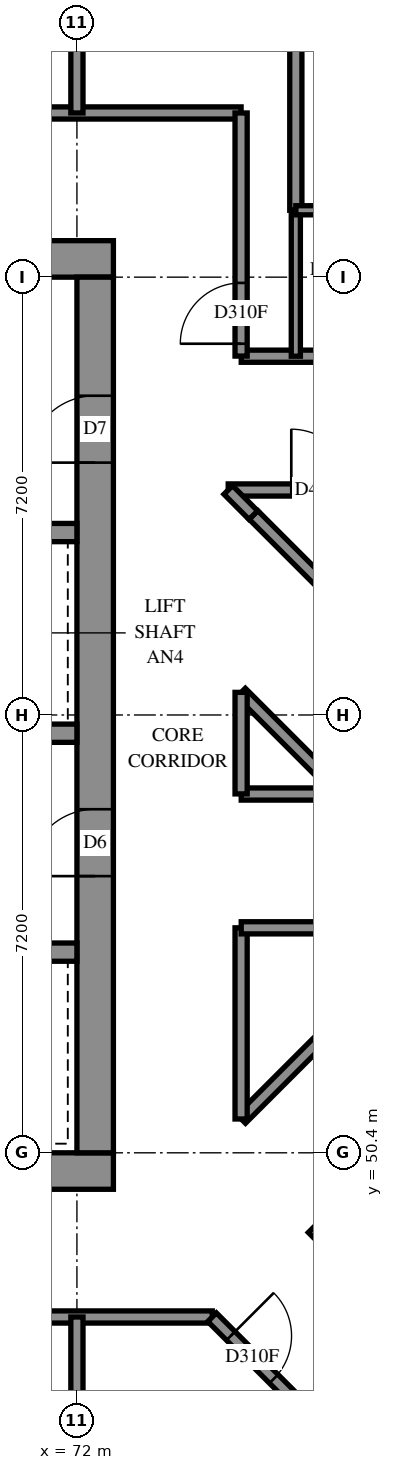
"""IFC4 building model, lengths in metres.
Left out: names, types, materials, properties, quantities, classifications, styles, units other than length and angle.
Written with IfcOpenShell. Run it as: python <this file> out.ifc"""

import sys

from ifc_helpers import new_model, si_unit, direction, frame, frame_2d, origin, place, context, subcontext, project, spatial, rectangle, extrude, element, fill, save


model = new_model("IFC4")
c1 = context("Model", 3, precision=1e-05, world=origin(), true_north=direction((0.0, 1.0)))
c2 = subcontext(c1, "Body", "Model", "MODEL_VIEW")
j1 = project(units=[si_unit("LENGTHUNIT", "METRE"), si_unit("PLANEANGLEUNIT", "RADIAN")], contexts=[c1])
p1 = place(None, origin())
s1 = spatial("IfcSite", under=j1, at=p1, CompositionType="ELEMENT")
p2 = place(p1, origin())
s2 = spatial("IfcBuilding", under=s1, at=p2, CompositionType="ELEMENT")
p3 = place(p2, frame((0.0, 0.0, 155.8)))
s3 = spatial("IfcBuildingStorey", under=s2, at=p3, CompositionType="ELEMENT", Elevation=155.8)
p4 = place(p3, frame((57.0, 50.1, -0.3), z_axis=(0.0, 0.0, 1.0), x_axis=(1.0, 0.0, 0.0)))
e1 = element("IfcWall", 1, at=p4, inside=s3, PredefinedType="SHEAR", context=c2, shape_type="SweptSolid", body=[
    extrude(rectangle(XDim=15.6, YDim=0.6, at=frame_2d((7.8, 0.0))), origin(), (0.0, 0.0, 1.0), 2.7),
])
p5 = place(p3, frame((57.0, 65.1, -0.3), z_axis=(0.0, 0.0, 1.0), x_axis=(1.0, 0.0, 0.0)))
e2 = element("IfcWall", 2, at=p5, inside=s3, PredefinedType="SHEAR", context=c2, shape_type="SweptSolid", body=[
    extrude(rectangle(XDim=15.6, YDim=0.6, at=frame_2d((7.8, 0.0))), origin(), (0.0, 0.0, 1.0), 2.7),
])
p6 = place(p5, frame((10.6, 0.0, 0.3)))
e3 = element("IfcOpeningElement", 3, at=p6, cuts=e2, PredefinedType="OPENING", context=c2, shape_type="SweptSolid", body=[
    extrude(rectangle(XDim=0.8, YDim=2.1, at=frame_2d((0.4, 1.05))), frame((0.0, 0.31, 0.0), z_axis=(0.0, -1.0, 0.0), x_axis=(1.0, 0.0, 0.0)), (0.0, 0.0, 1.0), 0.62),
])
p7 = place(p3, frame((72.3, 50.4, -0.3), z_axis=(0.0, 0.0, 1.0), x_axis=(0.0, 1.0, 0.0)))
e4 = element("IfcWall", 4, at=p7, inside=s3, PredefinedType="SHEAR", context=c2, shape_type="SweptSolid", body=[
    extrude(rectangle(XDim=14.4, YDim=0.6, at=frame_2d((7.2, 0.0))), origin(), (0.0, 0.0, 1.0), 2.7),
])
p8 = place(p7, frame((4.55, 0.0, 0.3)))
e5 = element("IfcOpeningElement", 5, at=p8, cuts=e4, PredefinedType="OPENING", context=c2, shape_type="SweptSolid", body=[
    extrude(rectangle(XDim=1.1, YDim=2.1, at=frame_2d((0.55, 1.05))), frame((0.0, 0.31, 0.0), z_axis=(0.0, -1.0, 0.0), x_axis=(1.0, 0.0, 0.0)), (0.0, 0.0, 1.0), 0.62),
])
p9 = place(p7, frame((11.35, 0.0, 0.3)))
e6 = element("IfcOpeningElement", 6, at=p9, cuts=e4, PredefinedType="OPENING", context=c2, shape_type="SweptSolid", body=[
    extrude(rectangle(XDim=1.1, YDim=2.1, at=frame_2d((0.55, 1.05))), frame((0.0, 0.31, 0.0), z_axis=(0.0, -1.0, 0.0), x_axis=(1.0, 0.0, 0.0)), (0.0, 0.0, 1.0), 0.62),
])
p10 = place(p3, frame((57.6, 53.7, 0.0), z_axis=(0.0, 0.0, 1.0), x_axis=(1.0, 0.0, 0.0)))
e7 = element("IfcWall", 7, at=p10, inside=s3, PredefinedType="SOLIDWALL", context=c2, shape_type="SweptSolid", body=[
    extrude(rectangle(XDim=14.4, YDim=0.3, at=frame_2d((7.2, 0.0))), origin(), (0.0, 0.0, 1.0), 3.1),
])
p11 = place(p10, frame((1.35, 0.0, 0.0)))
e8 = element("IfcOpeningElement", 8, at=p11, cuts=e7, PredefinedType="OPENING", context=c2, shape_type="SweptSolid", body=[
    extrude(rectangle(XDim=0.9, YDim=2.1, at=frame_2d((0.45, 1.05))), frame((0.0, 0.16, 0.0), z_axis=(0.0, -1.0, 0.0), x_axis=(1.0, 0.0, 0.0)), (0.0, 0.0, 1.0), 0.32),
])
p12 = place(p10, frame((4.95, 0.0, 0.0)))
e9 = element("IfcOpeningElement", 9, at=p12, cuts=e7, PredefinedType="OPENING", context=c2, shape_type="SweptSolid", body=[
    extrude(rectangle(XDim=0.9, YDim=2.1, at=frame_2d((0.45, 1.05))), frame((0.0, 0.16, 0.0), z_axis=(0.0, -1.0, 0.0), x_axis=(1.0, 0.0, 0.0)), (0.0, 0.0, 1.0), 0.32),
])
p13 = place(p10, frame((8.55, 0.0, 0.0)))
e10 = element("IfcOpeningElement", 10, at=p13, cuts=e7, PredefinedType="OPENING", context=c2, shape_type="SweptSolid", body=[
    extrude(rectangle(XDim=0.9, YDim=2.1, at=frame_2d((0.45, 1.05))), frame((0.0, 0.16, 0.0), z_axis=(0.0, -1.0, 0.0), x_axis=(1.0, 0.0, 0.0)), (0.0, 0.0, 1.0), 0.32),
])
p14 = place(p10, frame((12.05, 0.0, 0.0)))
e11 = element("IfcOpeningElement", 11, at=p14, cuts=e7, PredefinedType="OPENING", context=c2, shape_type="SweptSolid", body=[
    extrude(rectangle(XDim=1.1, YDim=2.1, at=frame_2d((0.55, 1.05))), frame((0.0, 0.16, 0.0), z_axis=(0.0, -1.0, 0.0), x_axis=(1.0, 0.0, 0.0)), (0.0, 0.0, 1.0), 0.32),
])
p15 = place(p3, frame((57.6, 57.3, 0.0), z_axis=(0.0, 0.0, 1.0), x_axis=(1.0, 0.0, 0.0)))
e12 = element("IfcWall", 12, at=p15, inside=s3, PredefinedType="SOLIDWALL", context=c2, shape_type="SweptSolid", body=[
    extrude(rectangle(XDim=14.4, YDim=0.3, at=frame_2d((7.2, 0.0))), origin(), (0.0, 0.0, 1.0), 3.1),
])
p16 = place(p15, frame((1.25, 0.0, 0.0)))
e13 = element("IfcOpeningElement", 13, at=p16, cuts=e12, PredefinedType="OPENING", context=c2, shape_type="SweptSolid", body=[
    extrude(rectangle(XDim=1.1, YDim=2.1, at=frame_2d((0.55, 1.05))), frame((0.0, 0.16, 0.0), z_axis=(0.0, -1.0, 0.0), x_axis=(1.0, 0.0, 0.0)), (0.0, 0.0, 1.0), 0.32),
])
p17 = place(p15, frame((4.85, 0.0, 0.0)))
e14 = element("IfcOpeningElement", 14, at=p17, cuts=e12, PredefinedType="OPENING", context=c2, shape_type="SweptSolid", body=[
    extrude(rectangle(XDim=1.1, YDim=2.1, at=frame_2d((0.55, 1.05))), frame((0.0, 0.16, 0.0), z_axis=(0.0, -1.0, 0.0), x_axis=(1.0, 0.0, 0.0)), (0.0, 0.0, 1.0), 0.32),
])
p18 = place(p15, frame((8.45, 0.0, 0.0)))
e15 = element("IfcOpeningElement", 15, at=p18, cuts=e12, PredefinedType="OPENING", context=c2, shape_type="SweptSolid", body=[
    extrude(rectangle(XDim=1.1, YDim=2.1, at=frame_2d((0.55, 1.05))), frame((0.0, 0.16, 0.0), z_axis=(0.0, -1.0, 0.0), x_axis=(1.0, 0.0, 0.0)), (0.0, 0.0, 1.0), 0.32),
])
p19 = place(p15, frame((12.05, 0.0, 0.0)))
e16 = element("IfcOpeningElement", 16, at=p19, cuts=e12, PredefinedType="OPENING", context=c2, shape_type="SweptSolid", body=[
    extrude(rectangle(XDim=1.1, YDim=2.1, at=frame_2d((0.55, 1.05))), frame((0.0, 0.16, 0.0), z_axis=(0.0, -1.0, 0.0), x_axis=(1.0, 0.0, 0.0)), (0.0, 0.0, 1.0), 0.32),
])
p20 = place(p3, frame((64.8, 60.6, 0.0), z_axis=(0.0, 0.0, 1.0), x_axis=(1.0, 0.0, 0.0)))
e17 = element("IfcWall", 17, at=p20, inside=s3, PredefinedType="SOLIDWALL", context=c2, shape_type="SweptSolid", body=[
    extrude(rectangle(XDim=7.2, YDim=0.3, at=frame_2d((3.6, 0.0))), origin(), (0.0, 0.0, 1.0), 3.1),
])
p21 = place(p3, frame((76.018, 49.302, -0.3), z_axis=(0.0, 0.0, 1.0), x_axis=(0.7071067812, -0.7071067812, 0.0)))
e18 = element("IfcWall", 18, at=p21, inside=s3, PredefinedType="SHEAR", context=c2, shape_type="SweptSolid", body=[
    extrude(rectangle(XDim=15.6, YDim=0.6, at=frame_2d((7.8, 0.0))), origin(), (0.0, 0.0, 1.0), 2.7),
])
p22 = place(p3, frame((54.9, 67.5, 0.0), z_axis=(0.0, 0.0, 1.0), x_axis=(1.0, 0.0, 0.0)))
e19 = element("IfcWall", 19, at=p22, inside=s3, PredefinedType="PARTITIONING", context=c2, shape_type="SweptSolid", body=[
    extrude(rectangle(XDim=19.8, YDim=0.2, at=frame_2d((9.9, 0.0))), origin(), (0.0, 0.0, 1.0), 3.1),
])
p23 = place(p22, frame((6.599, 0.0, 0.0)))
e20 = element("IfcOpeningElement", 20, at=p23, cuts=e19, PredefinedType="OPENING", context=c2, shape_type="SweptSolid", body=[
    extrude(rectangle(XDim=0.9, YDim=2.1, at=frame_2d((0.45, 1.05))), frame((0.0, 0.11, 0.0), z_axis=(0.0, -1.0, 0.0), x_axis=(1.0, 0.0, 0.0)), (0.0, 0.0, 1.0), 0.22),
])
p24 = place(p22, frame((13.799, 0.0, 0.0)))
e21 = element("IfcOpeningElement", 21, at=p24, cuts=e19, PredefinedType="OPENING", context=c2, shape_type="SweptSolid", body=[
    extrude(rectangle(XDim=0.9, YDim=2.1, at=frame_2d((0.45, 1.05))), frame((0.0, 0.11, 0.0), z_axis=(0.0, -1.0, 0.0), x_axis=(1.0, 0.0, 0.0)), (0.0, 0.0, 1.0), 0.22),
])
p25 = place(p3, frame((54.9, 47.7, 0.0), z_axis=(0.0, 0.0, 1.0), x_axis=(1.0, 0.0, 0.0)))
e22 = element("IfcWall", 22, at=p25, inside=s3, PredefinedType="PARTITIONING", context=c2, shape_type="SweptSolid", body=[
    extrude(rectangle(XDim=19.326, YDim=0.2, at=frame_2d((9.663, 0.0))), origin(), (0.0, 0.0, 1.0), 3.1),
])
p26 = place(p25, frame((6.643, 0.0, 0.0)))
e23 = element("IfcOpeningElement", 23, at=p26, cuts=e22, PredefinedType="OPENING", context=c2, shape_type="SweptSolid", body=[
    extrude(rectangle(XDim=0.9, YDim=2.1, at=frame_2d((0.45, 1.05))), frame((0.0, 0.11, 0.0), z_axis=(0.0, -1.0, 0.0), x_axis=(1.0, 0.0, 0.0)), (0.0, 0.0, 1.0), 0.22),
])
p27 = place(p25, frame((13.843, 0.0, 0.0)))
e24 = element("IfcOpeningElement", 24, at=p27, cuts=e22, PredefinedType="OPENING", context=c2, shape_type="SweptSolid", body=[
    extrude(rectangle(XDim=0.9, YDim=2.1, at=frame_2d((0.45, 1.05))), frame((0.0, 0.11, 0.0), z_axis=(0.0, -1.0, 0.0), x_axis=(1.0, 0.0, 0.0)), (0.0, 0.0, 1.0), 0.22),
])
p28 = place(p3, frame((75.6, 65.9, 0.0), z_axis=(0.0, 0.0, 1.0), x_axis=(0.0, 1.0, 0.0)))
e25 = element("IfcWall", 25, at=p28, inside=s3, PredefinedType="PARTITIONING", context=c2, shape_type="SweptSolid", body=[
    extrude(rectangle(XDim=6.89, YDim=0.2, at=frame_2d((3.445, 0.0))), origin(), (0.0, 0.0, 1.0), 3.1),
])
p29 = place(p3, frame((74.903, 60.889, 0.0), z_axis=(0.0, 0.0, 1.0), x_axis=(0.7071067812, -0.7071067812, 0.0)))
e26 = element("IfcWall", 26, at=p29, inside=s3, PredefinedType="PARTITIONING", context=c2, shape_type="SweptSolid", body=[
    extrude(rectangle(XDim=6.081, YDim=0.2, at=frame_2d((3.041, 0.0))), origin(), (0.0, 0.0, 1.0), 3.1),
])
p30 = place(p3, frame((74.488, 61.3, 0.0), z_axis=(0.0, 0.0, 1.0), x_axis=(1.0, 0.0, 0.0)))
e27 = element("IfcWall", 27, at=p30, inside=s3, PredefinedType="PARTITIONING", context=c2, shape_type="SweptSolid", body=[
    extrude(rectangle(XDim=4.712, YDim=0.2, at=frame_2d((2.356, 0.0))), origin(), (0.0, 0.0, 1.0), 3.1),
])
p31 = place(p30, frame((1.037, 0.0, 0.0)))
e28 = element("IfcOpeningElement", 28, at=p31, cuts=e27, PredefinedType="OPENING", context=c2, shape_type="SweptSolid", body=[
    extrude(rectangle(XDim=1.0, YDim=2.1, at=frame_2d((0.5, 1.05))), frame((0.0, 0.11, 0.0), z_axis=(0.0, -1.0, 0.0), x_axis=(1.0, 0.0, 0.0)), (0.0, 0.0, 1.0), 0.22),
])
p32 = place(p3, frame((74.223, 47.697, 0.0), z_axis=(0.0, 0.0, 1.0), x_axis=(0.7071067812, -0.7071067812, 0.0)))
e29 = element("IfcWall", 29, at=p32, inside=s3, PredefinedType="PARTITIONING", context=c2, shape_type="SweptSolid", body=[
    extrude(rectangle(XDim=4.63, YDim=0.2, at=frame_2d((2.315, 0.0))), origin(), (0.0, 0.0, 1.0), 3.1),
])
p33 = place(p32, frame((0.434, 0.0, 0.0)))
e30 = element("IfcOpeningElement", 30, at=p33, cuts=e29, PredefinedType="OPENING", context=c2, shape_type="SweptSolid", body=[
    extrude(rectangle(XDim=1.0, YDim=2.1, at=frame_2d((0.5, 1.05))), frame((0.0, 0.11, 0.0), z_axis=(0.0, -1.0, 0.0), x_axis=(1.0, 0.0, 0.0)), (0.0, 0.0, 1.0), 0.22),
])
p34 = place(p3, frame((74.702, 63.5, 0.0), z_axis=(0.0, 0.0, 1.0), x_axis=(1.0, 0.0, 0.0)))
e31 = element("IfcWall", 31, at=p34, inside=s3, PredefinedType="PARTITIONING", context=c2, shape_type="SweptSolid", body=[
    extrude(rectangle(XDim=4.498, YDim=0.2, at=frame_2d((2.249, 0.0))), origin(), (0.0, 0.0, 1.0), 3.1),
])
p35 = place(p34, frame((3.046, 0.0, 0.0)))
e32 = element("IfcOpeningElement", 32, at=p35, cuts=e31, PredefinedType="OPENING", context=c2, shape_type="SweptSolid", body=[
    extrude(rectangle(XDim=0.9, YDim=2.1, at=frame_2d((0.45, 1.05))), frame((0.0, 0.11, 0.0), z_axis=(0.0, -1.0, 0.0), x_axis=(1.0, 0.0, 0.0)), (0.0, 0.0, 1.0), 0.22),
])
p36 = place(p3, frame((74.701, 50.957, 0.0), z_axis=(0.0, 0.0, 1.0), x_axis=(0.7071067812, 0.7071067812, 0.0)))
e33 = element("IfcWall", 33, at=p36, inside=s3, PredefinedType="PARTITIONING", context=c2, shape_type="SweptSolid", body=[
    extrude(rectangle(XDim=4.444, YDim=0.2, at=frame_2d((2.222, 0.0))), origin(), (0.0, 0.0, 1.0), 3.1),
])
for number, where, z_axis, x_axis in (
    (34, (72.0, 43.65, 0.0), (0.0, 0.0, 1.0), (0.0, 1.0, 0.0)),
    (35, (72.0, 67.5, 0.0), (0.0, 0.0, 1.0), (0.0, 1.0, 0.0)),
):
    element("IfcWall", number, at=place(p3, frame(where, z_axis=z_axis, x_axis=x_axis)), inside=s3, PredefinedType="PARTITIONING", context=c2, shape_type="SweptSolid", body=[
        extrude(rectangle(XDim=4.05, YDim=0.2, at=frame_2d((2.025, 0.0))), origin(), (0.0, 0.0, 1.0), 3.1),
    ])
p37 = place(p3, frame((74.7, 63.502, 0.0), z_axis=(0.0, 0.0, 1.0), x_axis=(0.0, 1.0, 0.0)))
e36 = element("IfcWall", 36, at=p37, inside=s3, PredefinedType="PARTITIONING", context=c2, shape_type="SweptSolid", body=[
    extrude(rectangle(XDim=3.998, YDim=0.2, at=frame_2d((1.999, 0.0))), origin(), (0.0, 0.0, 1.0), 3.1),
])
p38 = place(p37, frame((0.203, 0.0, 0.0)))
e37 = element("IfcOpeningElement", 37, at=p38, cuts=e36, PredefinedType="OPENING", context=c2, shape_type="SweptSolid", body=[
    extrude(rectangle(XDim=1.0, YDim=2.1, at=frame_2d((0.5, 1.05))), frame((0.0, 0.11, 0.0), z_axis=(0.0, -1.0, 0.0), x_axis=(1.0, 0.0, 0.0)), (0.0, 0.0, 1.0), 0.22),
])
p39 = place(p3, frame((74.7, 50.956, 0.0), z_axis=(0.0, 0.0, 1.0), x_axis=(0.0, 1.0, 0.0)))
e38 = element("IfcWall", 38, at=p39, inside=s3, PredefinedType="PARTITIONING", context=c2, shape_type="SweptSolid", body=[
    extrude(rectangle(XDim=3.144, YDim=0.2, at=frame_2d((1.572, 0.0))), origin(), (0.0, 0.0, 1.0), 3.1),
])
p40 = place(p3, frame((74.702, 54.1, 0.0), z_axis=(0.0, 0.0, 1.0), x_axis=(1.0, 0.0, 0.0)))
e39 = element("IfcWall", 39, at=p40, inside=s3, PredefinedType="PARTITIONING", context=c2, shape_type="SweptSolid", body=[
    extrude(rectangle(XDim=3.142, YDim=0.2, at=frame_2d((1.571, 0.0))), origin(), (0.0, 0.0, 1.0), 3.1),
])
p41 = place(p3, frame((75.6, 63.5, 0.0), z_axis=(0.0, 0.0, 1.0), x_axis=(0.0, 1.0, 0.0)))
e40 = element("IfcWall", 40, at=p41, inside=s3, PredefinedType="PARTITIONING", context=c2, shape_type="SweptSolid", body=[
    extrude(rectangle(XDim=2.4, YDim=0.15, at=frame_2d((1.2, 0.0))), origin(), (0.0, 0.0, 1.0), 3.1),
])
p42 = place(p3, frame((74.699, 57.969, 0.0), z_axis=(0.0, 0.0, 1.0), x_axis=(0.7071067812, -0.7071067812, 0.0)))
e41 = element("IfcWall", 41, at=p42, inside=s3, PredefinedType="PARTITIONING", context=c2, shape_type="SweptSolid", body=[
    extrude(rectangle(XDim=2.362, YDim=0.2, at=frame_2d((1.181, 0.0))), origin(), (0.0, 0.0, 1.0), 3.1),
])
p43 = place(p3, frame((75.6, 65.9, 0.0), z_axis=(0.0, 0.0, 1.0), x_axis=(1.0, 0.0, 0.0)))
e42 = element("IfcWall", 42, at=p43, inside=s3, PredefinedType="PARTITIONING", context=c2, shape_type="SweptSolid", body=[
    extrude(rectangle(XDim=1.9, YDim=0.15, at=frame_2d((0.95, 0.0))), origin(), (0.0, 0.0, 1.0), 3.1),
])
p44 = place(p43, frame((0.607, 0.0, 0.0)))
e43 = element("IfcOpeningElement", 43, at=p44, cuts=e42, PredefinedType="OPENING", context=c2, shape_type="SweptSolid", body=[
    extrude(rectangle(XDim=0.8, YDim=2.1, at=frame_2d((0.4, 1.05))), frame((0.0, 0.085, 0.0), z_axis=(0.0, -1.0, 0.0), x_axis=(1.0, 0.0, 0.0)), (0.0, 0.0, 1.0), 0.17),
])
for number, where, z_axis, x_axis in (
    (44, (74.702, 56.3, 0.0), (0.0, 0.0, 1.0), (1.0, 0.0, 0.0)),
    (45, (74.7, 56.302, 0.0), (0.0, 0.0, 1.0), (0.0, 1.0, 0.0)),
):
    element("IfcWall", number, at=place(p3, frame(where, z_axis=z_axis, x_axis=x_axis)), inside=s3, PredefinedType="PARTITIONING", context=c2, shape_type="SweptSolid", body=[
        extrude(rectangle(XDim=1.67, YDim=0.2, at=frame_2d((0.835, 0.0))), origin(), (0.0, 0.0, 1.0), 3.1),
    ])
p45 = place(p3, frame((74.489, 61.301, 0.0), z_axis=(0.0, 0.0, 1.0), x_axis=(0.7053925905, -0.7088168263, 0.0)))
e46 = element("IfcWall", 46, at=p45, inside=s3, PredefinedType="PARTITIONING", context=c2, shape_type="SweptSolid", body=[
    extrude(rectangle(XDim=0.584, YDim=0.2, at=frame_2d((0.292, 0.0))), origin(), (0.0, 0.0, 1.0), 3.1),
])
p46 = place(p8, origin())
e47 = element("IfcDoor", 47, at=p46, inside=s3, OperationType="DOUBLE_DOOR_SINGLE_SWING", PredefinedType="DOOR", context=c2, shape_type="SweptSolid", body=[
    extrude(rectangle(XDim=1.1, YDim=2.1, at=frame_2d((0.55, 1.05))), frame((0.0, 0.025, 0.0), z_axis=(0.0, -1.0, 0.0), x_axis=(1.0, 0.0, 0.0)), (0.0, 0.0, 1.0), 0.05),
])
fill(e5, e47)
p47 = place(p9, origin())
e48 = element("IfcDoor", 48, at=p47, inside=s3, OperationType="SINGLE_SWING_RIGHT", PredefinedType="DOOR", context=c2, shape_type="SweptSolid", body=[
    extrude(rectangle(XDim=1.1, YDim=2.1, at=frame_2d((0.55, 1.05))), frame((0.0, 0.025, 0.0), z_axis=(0.0, -1.0, 0.0), x_axis=(1.0, 0.0, 0.0)), (0.0, 0.0, 1.0), 0.05),
])
fill(e6, e48)
p48 = place(p38, origin())
e49 = element("IfcDoor", 49, at=p48, inside=s3, OperationType="SINGLE_SWING_RIGHT", PredefinedType="DOOR", context=c2, shape_type="SweptSolid", body=[
    extrude(rectangle(XDim=1.0, YDim=2.1, at=frame_2d((0.5, 1.05))), frame((0.0, 0.025, 0.0), z_axis=(0.0, -1.0, 0.0), x_axis=(1.0, 0.0, 0.0)), (0.0, 0.0, 1.0), 0.05),
])
fill(e37, e49)
p49 = place(p31, origin())
e50 = element("IfcDoor", 50, at=p49, inside=s3, OperationType="SINGLE_SWING_RIGHT", PredefinedType="DOOR", context=c2, shape_type="SweptSolid", body=[
    extrude(rectangle(XDim=1.0, YDim=2.1, at=frame_2d((0.5, 1.05))), frame((0.0, 0.025, 0.0), z_axis=(0.0, -1.0, 0.0), x_axis=(1.0, 0.0, 0.0)), (0.0, 0.0, 1.0), 0.05),
])
fill(e28, e50)
p50 = place(p33, origin())
e51 = element("IfcDoor", 51, at=p50, inside=s3, OperationType="SINGLE_SWING_LEFT", PredefinedType="DOOR", context=c2, shape_type="SweptSolid", body=[
    extrude(rectangle(XDim=1.0, YDim=2.1, at=frame_2d((0.5, 1.05))), frame((0.0, 0.025, 0.0), z_axis=(0.0, -1.0, 0.0), x_axis=(1.0, 0.0, 0.0)), (0.0, 0.0, 1.0), 0.05),
])
fill(e30, e51)
save(model, sys.argv[1])
